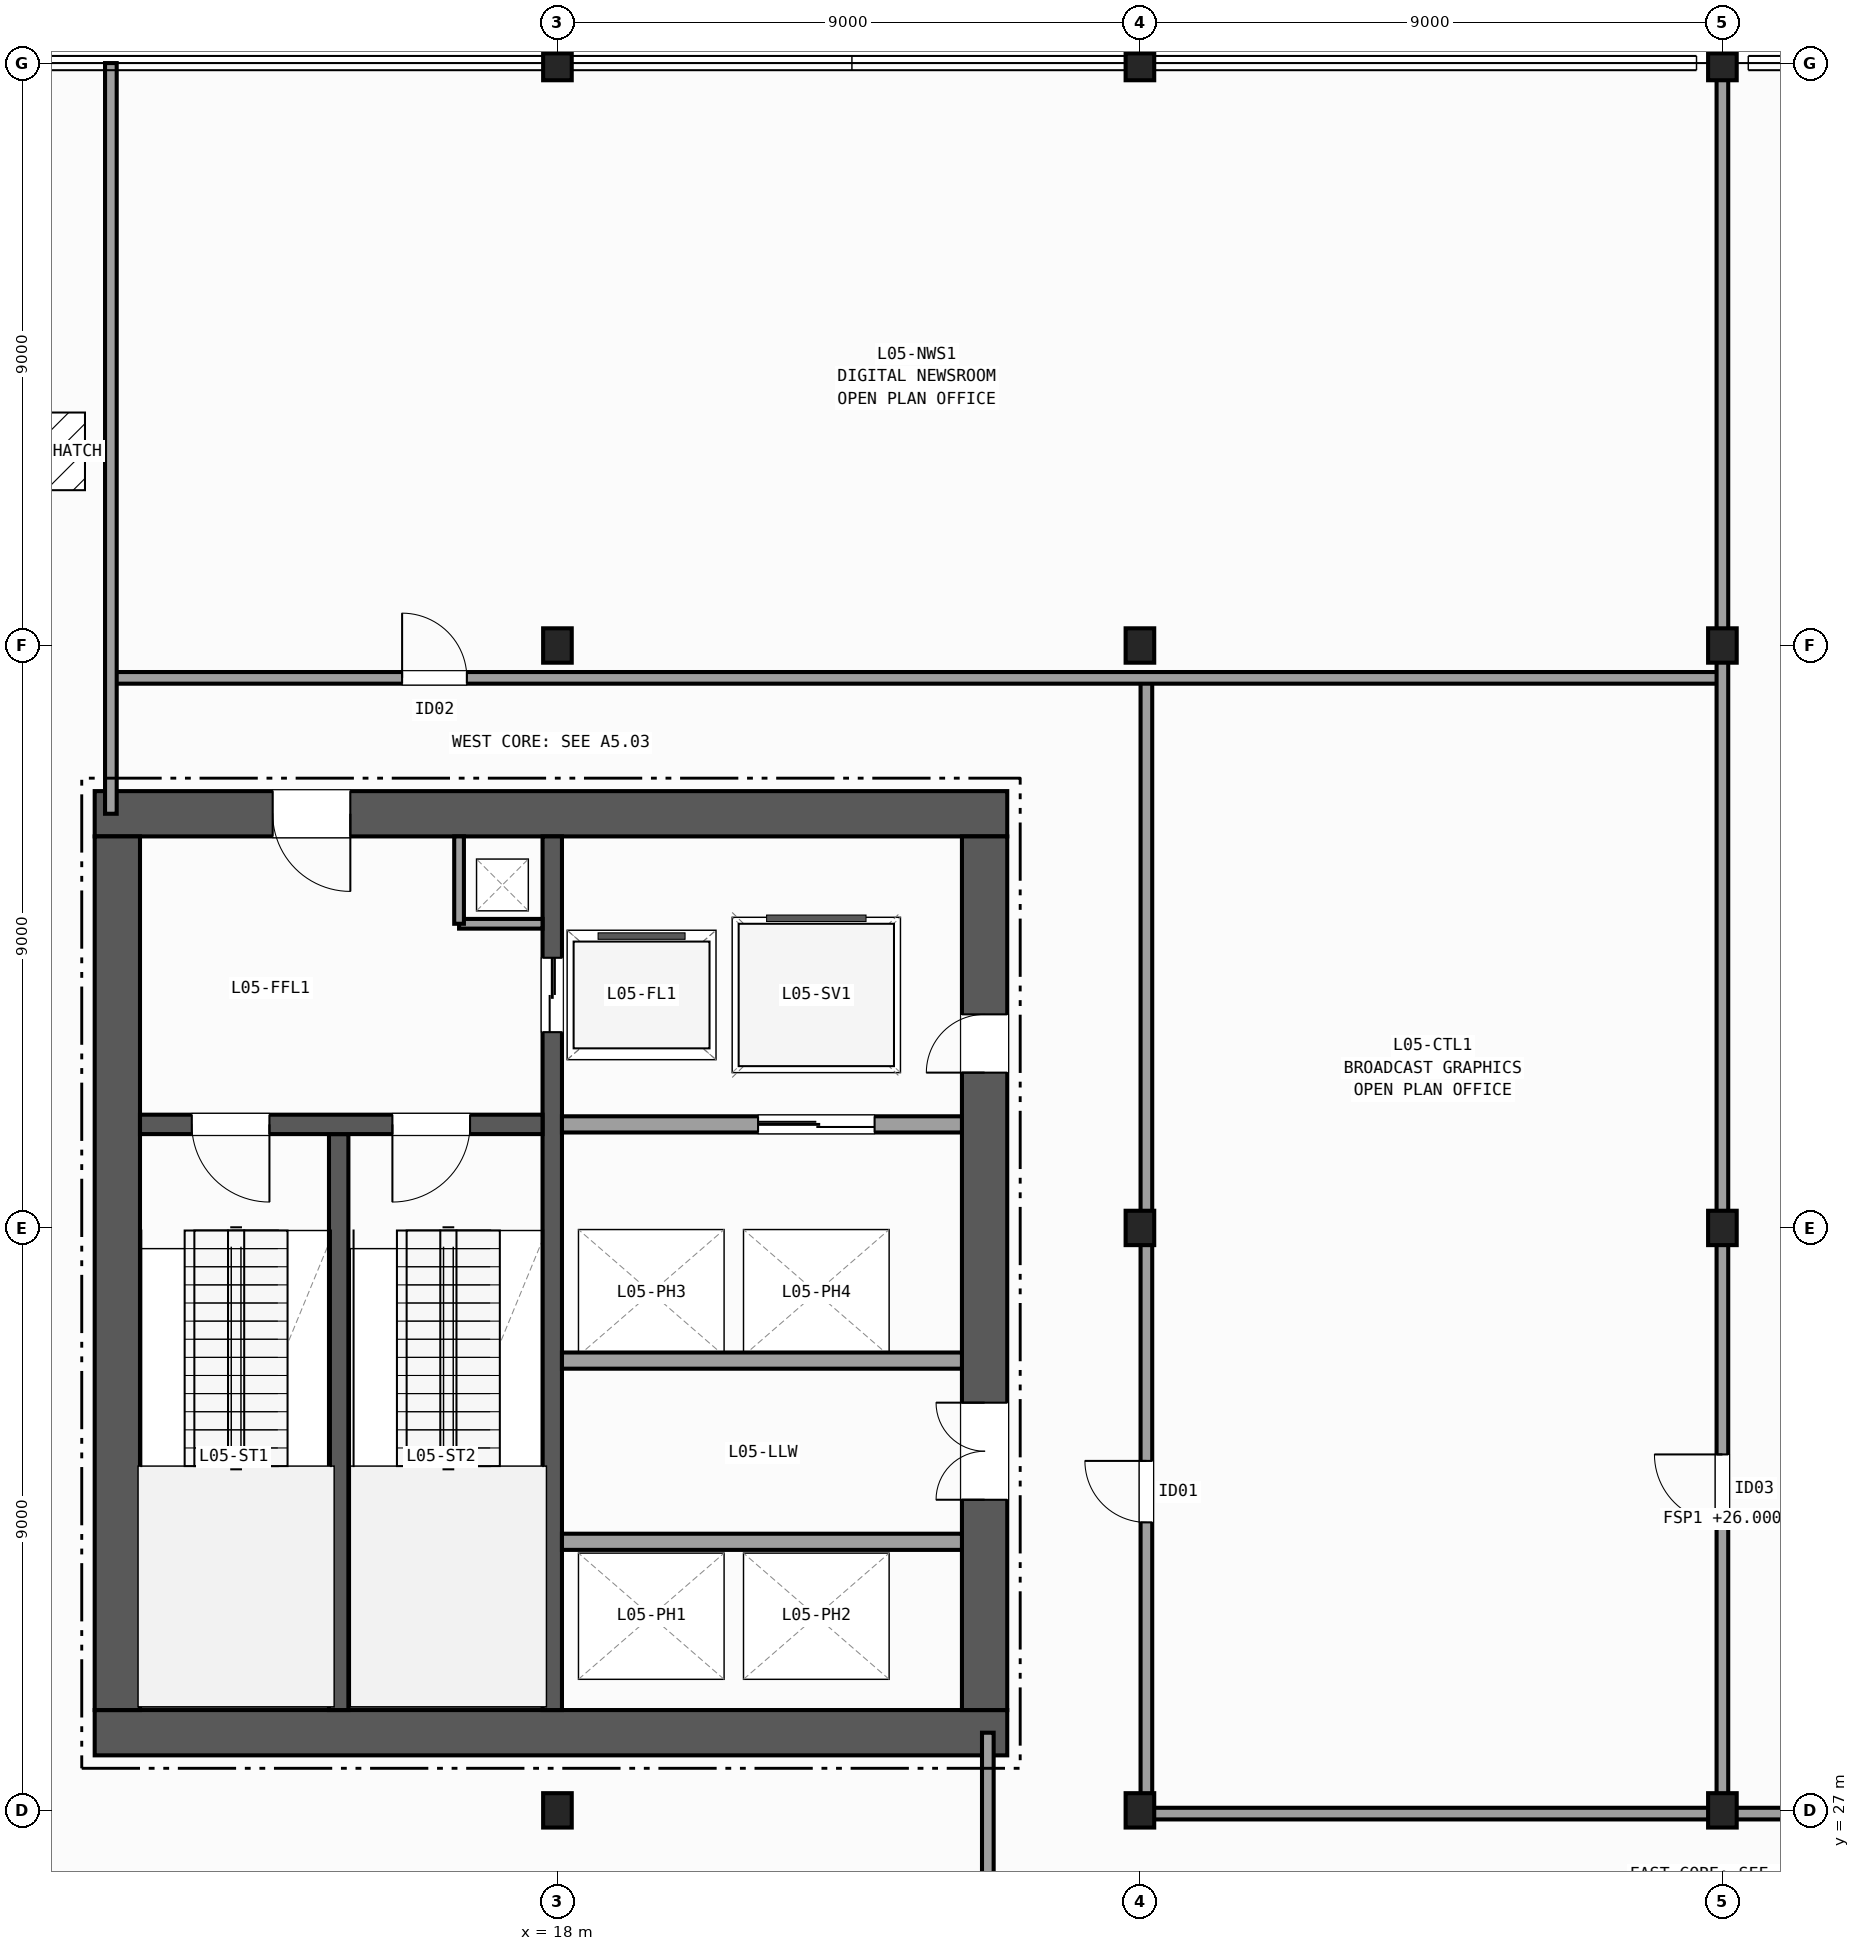
"""IFC4 building model, lengths in metres.
Left out: names, types, materials, properties, quantities, classifications, styles, units other than length and angle.
Written with IfcOpenShell. Run it as: python <this file> out.ifc"""

import sys

from ifc_helpers import new_model, si_unit, direction, frame, frame_2d, origin, origin_2d, place, context, subcontext, project, spatial, rectangle, i_section, extrude, element, fill, save


model = new_model("IFC4")
c1 = context("Model", 3, precision=1e-05, world=origin(), true_north=direction((0.0, 1.0)))
c2 = subcontext(c1, "Body", "Model", "MODEL_VIEW")
j1 = project(units=[si_unit("LENGTHUNIT", "METRE"), si_unit("PLANEANGLEUNIT", "RADIAN")], contexts=[c1])
p1 = place(None, origin())
s1 = spatial("IfcSite", under=j1, at=p1, CompositionType="ELEMENT")
p2 = place(p1, origin())
s2 = spatial("IfcBuilding", under=s1, at=p2, CompositionType="ELEMENT")
p3 = place(p2, frame((0.0, 0.0, 26.0)))
s3 = spatial("IfcBuildingStorey", under=s2, at=p3, CompositionType="ELEMENT", Elevation=26.0)
for number, where, z_axis, x_axis in (
    (1, (18.0, 27.0, 0.0), (0.0, 0.0, 1.0), (1.0, 0.0, 0.0)),
    (2, (18.0, 45.0, 0.0), (0.0, 0.0, 1.0), (1.0, 0.0, 0.0)),
    (3, (18.0, 54.0, 0.0), (0.0, 0.0, 1.0), (1.0, 0.0, 0.0)),
    (4, (27.0, 27.0, 0.0), (0.0, 0.0, 1.0), (1.0, 0.0, 0.0)),
    (5, (27.0, 36.0, 0.0), (0.0, 0.0, 1.0), (1.0, 0.0, 0.0)),
    (6, (27.0, 45.0, 0.0), (0.0, 0.0, 1.0), (1.0, 0.0, 0.0)),
    (7, (27.0, 54.0, 0.0), (0.0, 0.0, 1.0), (1.0, 0.0, 0.0)),
    (8, (36.0, 27.0, 0.0), (0.0, 0.0, 1.0), (1.0, 0.0, 0.0)),
    (9, (36.0, 36.0, 0.0), (0.0, 0.0, 1.0), (1.0, 0.0, 0.0)),
    (10, (36.0, 45.0, 0.0), (0.0, 0.0, 1.0), (1.0, 0.0, 0.0)),
    (11, (36.0, 54.0, 0.0), (0.0, 0.0, 1.0), (1.0, 0.0, 0.0)),
):
    element("IfcColumn", number, at=place(p3, frame(where, z_axis=z_axis, x_axis=x_axis)), inside=s3, PredefinedType="COLUMN", context=c2, shape_type="SweptSolid", body=[
        extrude(i_section(OverallWidth=0.442, OverallDepth=0.531, WebThickness=0.066, FlangeThickness=0.106, FilletRadius=0.015, at=origin_2d()), origin(), (0.0, 0.0, 1.0), 4.8),
    ])
p4 = place(p3, frame((10.85, 28.2, 0.0), z_axis=(0.0, 0.0, 1.0), x_axis=(1.0, 0.0, 0.0)))
e12 = element("IfcWall", 12, at=p4, inside=s3, PredefinedType="SHEAR", context=c2, shape_type="SweptSolid", body=[
    extrude(rectangle(XDim=14.1, YDim=0.7, at=frame_2d((7.05, 0.0))), origin(), (0.0, 0.0, 1.0), 4.44),
])
p5 = place(p3, frame((24.95, 42.4, 0.0), z_axis=(0.0, 0.0, 1.0), x_axis=(-1.0, 0.0, 0.0)))
e13 = element("IfcWall", 13, at=p5, inside=s3, PredefinedType="SHEAR", context=c2, shape_type="SweptSolid", body=[
    extrude(rectangle(XDim=14.1, YDim=0.7, at=frame_2d((7.05, 0.0))), origin(), (0.0, 0.0, 1.0), 4.44),
])
p6 = place(p5, frame((10.15, 0.0, 0.0)))
e14 = element("IfcOpeningElement", 14, at=p6, cuts=e13, PredefinedType="OPENING", context=c2, shape_type="SweptSolid", body=[
    extrude(rectangle(XDim=1.2, YDim=2.15, at=frame_2d((0.6, 1.075))), frame((0.0, 0.36, 0.0), z_axis=(0.0, -1.0, 0.0), x_axis=(1.0, 0.0, 0.0)), (0.0, 0.0, 1.0), 0.72),
])
p7 = place(p3, frame((11.2, 42.05, 0.0), z_axis=(0.0, 0.0, 1.0), x_axis=(0.0, -1.0, 0.0)))
e15 = element("IfcWall", 15, at=p7, inside=s3, PredefinedType="SHEAR", context=c2, shape_type="SweptSolid", body=[
    extrude(rectangle(XDim=13.5, YDim=0.7, at=frame_2d((6.75, 0.0))), origin(), (0.0, 0.0, 1.0), 4.44),
])
p8 = place(p3, frame((24.6, 28.55, 0.0), z_axis=(0.0, 0.0, 1.0), x_axis=(0.0, 1.0, 0.0)))
e16 = element("IfcWall", 16, at=p8, inside=s3, PredefinedType="SHEAR", context=c2, shape_type="SweptSolid", body=[
    extrude(rectangle(XDim=13.5, YDim=0.7, at=frame_2d((6.75, 0.0))), origin(), (0.0, 0.0, 1.0), 4.44),
])
p9 = place(p8, frame((3.25, 0.0, 0.0)))
e17 = element("IfcOpeningElement", 17, at=p9, cuts=e16, PredefinedType="OPENING", context=c2, shape_type="SweptSolid", body=[
    extrude(rectangle(XDim=1.5, YDim=2.2, at=frame_2d((0.75, 1.1))), frame((0.0, 0.36, 0.0), z_axis=(0.0, -1.0, 0.0), x_axis=(1.0, 0.0, 0.0)), (0.0, 0.0, 1.0), 0.72),
])
p10 = place(p8, frame((9.85, 0.0, 0.0)))
e18 = element("IfcOpeningElement", 18, at=p10, cuts=e16, PredefinedType="OPENING", context=c2, shape_type="SweptSolid", body=[
    extrude(rectangle(XDim=0.9, YDim=2.1, at=frame_2d((0.45, 1.05))), frame((0.0, 0.36, 0.0), z_axis=(0.0, -1.0, 0.0), x_axis=(1.0, 0.0, 0.0)), (0.0, 0.0, 1.0), 0.72),
])
p11 = place(p3, frame((14.62, 28.55, 0.0), z_axis=(0.0, 0.0, 1.0), x_axis=(0.0, 1.0, 0.0)))
e19 = element("IfcWall", 19, at=p11, inside=s3, PredefinedType="SHEAR", context=c2, shape_type="SweptSolid", body=[
    extrude(rectangle(XDim=8.9, YDim=0.3, at=frame_2d((4.45, 0.0))), origin(), (0.0, 0.0, 1.0), 4.44),
])
p12 = place(p3, frame((17.92, 42.05, 0.0), z_axis=(0.0, 0.0, 1.0), x_axis=(0.0, -1.0, 0.0)))
e20 = element("IfcWall", 20, at=p12, inside=s3, PredefinedType="SHEAR", context=c2, shape_type="SweptSolid", body=[
    extrude(rectangle(XDim=13.5, YDim=0.3, at=frame_2d((6.75, 0.0))), origin(), (0.0, 0.0, 1.0), 4.44),
])
p13 = place(p12, frame((1.875, 0.0, 0.0)))
e21 = element("IfcOpeningElement", 21, at=p13, cuts=e20, PredefinedType="OPENING", context=c2, shape_type="SweptSolid", body=[
    extrude(rectangle(XDim=1.15, YDim=2.15, at=frame_2d((0.575, 1.075))), frame((0.0, 0.16, 0.0), z_axis=(0.0, -1.0, 0.0), x_axis=(1.0, 0.0, 0.0)), (0.0, 0.0, 1.0), 0.32),
])
p14 = place(p3, frame((17.77, 37.6, 0.0), z_axis=(0.0, 0.0, 1.0), x_axis=(-1.0, 0.0, 0.0)))
e22 = element("IfcWall", 22, at=p14, inside=s3, PredefinedType="SHEAR", context=c2, shape_type="SweptSolid", body=[
    extrude(rectangle(XDim=6.22, YDim=0.3, at=frame_2d((3.11, 0.0))), origin(), (0.0, 0.0, 1.0), 4.44),
])
p15 = place(p14, frame((4.22, 0.0, 0.0)))
e23 = element("IfcOpeningElement", 23, at=p15, cuts=e22, PredefinedType="OPENING", context=c2, shape_type="SweptSolid", body=[
    extrude(rectangle(XDim=1.2, YDim=2.15, at=frame_2d((0.6, 1.075))), frame((0.0, 0.16, 0.0), z_axis=(0.0, -1.0, 0.0), x_axis=(1.0, 0.0, 0.0)), (0.0, 0.0, 1.0), 0.32),
])
p16 = place(p14, frame((1.12, 0.0, 0.0)))
e24 = element("IfcOpeningElement", 24, at=p16, cuts=e22, PredefinedType="OPENING", context=c2, shape_type="SweptSolid", body=[
    extrude(rectangle(XDim=1.2, YDim=2.15, at=frame_2d((0.6, 1.075))), frame((0.0, 0.16, 0.0), z_axis=(0.0, -1.0, 0.0), x_axis=(1.0, 0.0, 0.0)), (0.0, 0.0, 1.0), 0.32),
])
p17 = place(p3, frame((16.48, 40.7, 0.0), z_axis=(0.0, 0.0, 1.0), x_axis=(1.0, 0.0, 0.0)))
e25 = element("IfcWall", 25, at=p17, inside=s3, PredefinedType="PARTITIONING", context=c2, shape_type="SweptSolid", body=[
    extrude(rectangle(XDim=1.29, YDim=0.15, at=frame_2d((0.645, 0.0))), origin(), (0.0, 0.0, 1.0), 4.44),
])
p18 = place(p3, frame((16.48, 40.7, 0.0), z_axis=(0.0, 0.0, 1.0), x_axis=(0.0, 1.0, 0.0)))
e26 = element("IfcWall", 26, at=p18, inside=s3, PredefinedType="PARTITIONING", context=c2, shape_type="SweptSolid", body=[
    extrude(rectangle(XDim=1.35, YDim=0.15, at=frame_2d((0.675, 0.0))), origin(), (0.0, 0.0, 1.0), 4.44),
])
p19 = place(p3, frame((18.07, 37.6, 0.0), z_axis=(0.0, 0.0, 1.0), x_axis=(1.0, 0.0, 0.0)))
e27 = element("IfcWall", 27, at=p19, inside=s3, PredefinedType="PARTITIONING", context=c2, shape_type="SweptSolid", body=[
    extrude(rectangle(XDim=6.18, YDim=0.25, at=frame_2d((3.09, 0.0))), origin(), (0.0, 0.0, 1.0), 4.44),
])
p20 = place(p19, frame((3.03, 0.0, 0.0)))
e28 = element("IfcOpeningElement", 28, at=p20, cuts=e27, PredefinedType="OPENING", context=c2, shape_type="SweptSolid", body=[
    extrude(rectangle(XDim=1.8, YDim=2.3, at=frame_2d((0.9, 1.15))), frame((0.0, 0.135, 0.0), z_axis=(0.0, -1.0, 0.0), x_axis=(1.0, 0.0, 0.0)), (0.0, 0.0, 1.0), 0.27),
])
for number, where, z_axis, x_axis in (
    (29, (18.07, 31.15, 0.0), (0.0, 0.0, 1.0), (1.0, 0.0, 0.0)),
    (30, (24.25, 33.95, 0.0), (0.0, 0.0, 1.0), (-1.0, 0.0, 0.0)),
):
    element("IfcWall", number, at=place(p3, frame(where, z_axis=z_axis, x_axis=x_axis)), inside=s3, PredefinedType="PARTITIONING", context=c2, shape_type="SweptSolid", body=[
        extrude(rectangle(XDim=6.18, YDim=0.25, at=frame_2d((3.09, 0.0))), origin(), (0.0, 0.0, 1.0), 4.44),
    ])
p21 = place(p3, frame((24.65, 9.0, 0.0), z_axis=(0.0, 0.0, 1.0), x_axis=(0.0, 1.0, 0.0)))
e31 = element("IfcWall", 31, at=p21, inside=s3, PredefinedType="PARTITIONING", context=c2, shape_type="SweptSolid", body=[
    extrude(rectangle(XDim=19.2, YDim=0.18, at=frame_2d((9.6, 0.0))), origin(), (0.0, 0.0, 1.0), 3.493),
])
p22 = place(p21, frame((5.0, 0.0, 0.0)))
e32 = element("IfcOpeningElement", 32, at=p22, cuts=e31, PredefinedType="OPENING", context=c2, shape_type="SweptSolid", body=[
    extrude(rectangle(XDim=1.4, YDim=2.15, at=frame_2d((0.7, 1.075))), frame((0.0, 0.1, 0.0), z_axis=(0.0, -1.0, 0.0), x_axis=(1.0, 0.0, 0.0)), (0.0, 0.0, 1.0), 0.2),
])
p23 = place(p3, frame((27.1, 26.95, 0.0), z_axis=(0.0, 0.0, 1.0), x_axis=(1.0, 0.0, 0.0)))
e33 = element("IfcWall", 33, at=p23, inside=s3, PredefinedType="PARTITIONING", context=c2, shape_type="SweptSolid", body=[
    extrude(rectangle(XDim=35.9, YDim=0.18, at=frame_2d((17.95, 0.0))), origin(), (0.0, 0.0, 1.0), 2.62),
])
p24 = place(p3, frame((27.1, 26.95, 0.0), z_axis=(0.0, 0.0, 1.0), x_axis=(0.0, 1.0, 0.0)))
e34 = element("IfcWall", 34, at=p24, inside=s3, PredefinedType="PARTITIONING", context=c2, shape_type="SweptSolid", body=[
    extrude(rectangle(XDim=17.55, YDim=0.18, at=frame_2d((8.775, 0.0))), origin(), (0.0, 0.0, 1.0), 2.62),
])
p25 = place(p24, frame((4.5, 0.0, 0.0)))
e35 = element("IfcOpeningElement", 35, at=p25, cuts=e34, PredefinedType="OPENING", context=c2, shape_type="SweptSolid", body=[
    extrude(rectangle(XDim=0.95, YDim=2.1, at=frame_2d((0.475, 1.05))), frame((0.0, 0.1, 0.0), z_axis=(0.0, -1.0, 0.0), x_axis=(1.0, 0.0, 0.0)), (0.0, 0.0, 1.0), 0.2),
])
p26 = place(p3, frame((11.1, 44.5, 0.0), z_axis=(0.0, 0.0, 1.0), x_axis=(1.0, 0.0, 0.0)))
e36 = element("IfcWall", 36, at=p26, inside=s3, PredefinedType="PARTITIONING", context=c2, shape_type="SweptSolid", body=[
    extrude(rectangle(XDim=24.9, YDim=0.18, at=frame_2d((12.45, 0.0))), origin(), (0.0, 0.0, 1.0), 3.565),
])
p27 = place(p26, frame((4.5, 0.0, 0.0)))
e37 = element("IfcOpeningElement", 37, at=p27, cuts=e36, PredefinedType="OPENING", context=c2, shape_type="SweptSolid", body=[
    extrude(rectangle(XDim=1.0, YDim=2.1, at=frame_2d((0.5, 1.05))), frame((0.0, 0.1, 0.0), z_axis=(0.0, -1.0, 0.0), x_axis=(1.0, 0.0, 0.0)), (0.0, 0.0, 1.0), 0.2),
])
p28 = place(p3, frame((36.0, 26.95, 0.0), z_axis=(0.0, 0.0, 1.0), x_axis=(0.0, 1.0, 0.0)))
e38 = element("IfcWall", 38, at=p28, inside=s3, PredefinedType="PARTITIONING", context=c2, shape_type="SweptSolid", body=[
    extrude(rectangle(XDim=27.05, YDim=0.18, at=frame_2d((13.525, 0.0))), origin(), (0.0, 0.0, 1.0), 3.493),
])
p29 = place(p28, frame((4.5, 0.0, 0.0)))
e39 = element("IfcOpeningElement", 39, at=p29, cuts=e38, PredefinedType="OPENING", context=c2, shape_type="SweptSolid", body=[
    extrude(rectangle(XDim=1.05, YDim=2.15, at=frame_2d((0.525, 1.075))), frame((0.0, 0.1, 0.0), z_axis=(0.0, -1.0, 0.0), x_axis=(1.0, 0.0, 0.0)), (0.0, 0.0, 1.0), 0.2),
])
p30 = place(p3, frame((11.1, 42.4, 0.0), z_axis=(0.0, 0.0, 1.0), x_axis=(0.0, 1.0, 0.0)))
e40 = element("IfcWall", 40, at=p30, inside=s3, PredefinedType="PARTITIONING", context=c2, shape_type="SweptSolid", body=[
    extrude(rectangle(XDim=11.6, YDim=0.18, at=frame_2d((5.8, 0.0))), origin(), (0.0, 0.0, 1.0), 3.493),
])
p31 = place(p3, frame((0.0, 0.0, -0.32)))
p32 = place(p31, frame((10.2, 48.0, 0.0)))
p33 = place(p32, frame((0.0, 0.0, 0.27)))
e41 = element("IfcDoor", 41, at=p33, inside=s3, OperationType="SINGLE_SWING_LEFT", PredefinedType="TRAPDOOR", context=c2, shape_type="SweptSolid", body=[
    extrude(rectangle(XDim=1.0, YDim=1.2, at=origin_2d()), origin(), (0.0, 0.0, 1.0), 0.05),
])
p34 = place(p15, origin())
e42 = element("IfcDoor", 42, at=p34, inside=s3, OperationType="SINGLE_SWING_LEFT", PredefinedType="DOOR", context=c2, shape_type="SweptSolid", body=[
    extrude(rectangle(XDim=1.2, YDim=2.15, at=frame_2d((0.6, 1.075))), frame((0.0, 0.025, 0.0), z_axis=(0.0, -1.0, 0.0), x_axis=(1.0, 0.0, 0.0)), (0.0, 0.0, 1.0), 0.05),
])
fill(e23, e42)
p35 = place(p16, origin())
e43 = element("IfcDoor", 43, at=p35, inside=s3, OperationType="SINGLE_SWING_RIGHT", PredefinedType="DOOR", context=c2, shape_type="SweptSolid", body=[
    extrude(rectangle(XDim=1.2, YDim=2.15, at=frame_2d((0.6, 1.075))), frame((0.0, 0.025, 0.0), z_axis=(0.0, -1.0, 0.0), x_axis=(1.0, 0.0, 0.0)), (0.0, 0.0, 1.0), 0.05),
])
fill(e24, e43)
p36 = place(p9, origin())
e44 = element("IfcDoor", 44, at=p36, inside=s3, OperationType="DOUBLE_DOOR_SINGLE_SWING", PredefinedType="DOOR", context=c2, shape_type="SweptSolid", body=[
    extrude(rectangle(XDim=1.5, YDim=2.2, at=frame_2d((0.75, 1.1))), frame((0.0, 0.025, 0.0), z_axis=(0.0, -1.0, 0.0), x_axis=(1.0, 0.0, 0.0)), (0.0, 0.0, 1.0), 0.05),
])
fill(e17, e44)
p37 = place(p6, origin())
e45 = element("IfcDoor", 45, at=p37, inside=s3, OperationType="SINGLE_SWING_LEFT", PredefinedType="DOOR", context=c2, shape_type="SweptSolid", body=[
    extrude(rectangle(XDim=1.2, YDim=2.15, at=frame_2d((0.6, 1.075))), frame((0.0, 0.025, 0.0), z_axis=(0.0, -1.0, 0.0), x_axis=(1.0, 0.0, 0.0)), (0.0, 0.0, 1.0), 0.05),
])
fill(e14, e45)
p38 = place(p10, origin())
e46 = element("IfcDoor", 46, at=p38, inside=s3, OperationType="SINGLE_SWING_LEFT", PredefinedType="DOOR", context=c2, shape_type="SweptSolid", body=[
    extrude(rectangle(XDim=0.9, YDim=2.1, at=frame_2d((0.45, 1.05))), frame((0.0, 0.025, 0.0), z_axis=(0.0, -1.0, 0.0), x_axis=(1.0, 0.0, 0.0)), (0.0, 0.0, 1.0), 0.05),
])
fill(e18, e46)
p39 = place(p13, origin())
e47 = element("IfcDoor", 47, at=p39, inside=s3, OperationType="DOUBLE_DOOR_SLIDING", PredefinedType="DOOR", context=c2, shape_type="SweptSolid", body=[
    extrude(rectangle(XDim=1.15, YDim=2.15, at=frame_2d((0.575, 1.075))), frame((0.0, 0.025, 0.0), z_axis=(0.0, -1.0, 0.0), x_axis=(1.0, 0.0, 0.0)), (0.0, 0.0, 1.0), 0.05),
])
fill(e21, e47)
p40 = place(p20, origin())
e48 = element("IfcDoor", 48, at=p40, inside=s3, OperationType="DOUBLE_DOOR_SLIDING", PredefinedType="DOOR", context=c2, shape_type="SweptSolid", body=[
    extrude(rectangle(XDim=1.8, YDim=2.3, at=frame_2d((0.9, 1.15))), frame((0.0, 0.025, 0.0), z_axis=(0.0, -1.0, 0.0), x_axis=(1.0, 0.0, 0.0)), (0.0, 0.0, 1.0), 0.05),
])
fill(e28, e48)
p41 = place(p25, origin())
e49 = element("IfcDoor", 49, at=p41, inside=s3, OperationType="SINGLE_SWING_RIGHT", PredefinedType="DOOR", context=c2, shape_type="SweptSolid", body=[
    extrude(rectangle(XDim=0.95, YDim=2.1, at=frame_2d((0.475, 1.05))), frame((0.0, 0.025, 0.0), z_axis=(0.0, -1.0, 0.0), x_axis=(1.0, 0.0, 0.0)), (0.0, 0.0, 1.0), 0.05),
])
fill(e35, e49)
p42 = place(p27, origin())
e50 = element("IfcDoor", 50, at=p42, inside=s3, OperationType="SINGLE_SWING_LEFT", PredefinedType="DOOR", context=c2, shape_type="SweptSolid", body=[
    extrude(rectangle(XDim=1.0, YDim=2.1, at=frame_2d((0.5, 1.05))), frame((0.0, 0.025, 0.0), z_axis=(0.0, -1.0, 0.0), x_axis=(1.0, 0.0, 0.0)), (0.0, 0.0, 1.0), 0.05),
])
fill(e37, e50)
p43 = place(p29, origin())
e51 = element("IfcDoor", 51, at=p43, inside=s3, OperationType="SINGLE_SWING_RIGHT", PredefinedType="DOOR", context=c2, shape_type="SweptSolid", body=[
    extrude(rectangle(XDim=1.05, YDim=2.15, at=frame_2d((0.525, 1.075))), frame((0.0, 0.025, 0.0), z_axis=(0.0, -1.0, 0.0), x_axis=(1.0, 0.0, 0.0)), (0.0, 0.0, 1.0), 0.05),
])
fill(e39, e51)
save(model, sys.argv[1])
